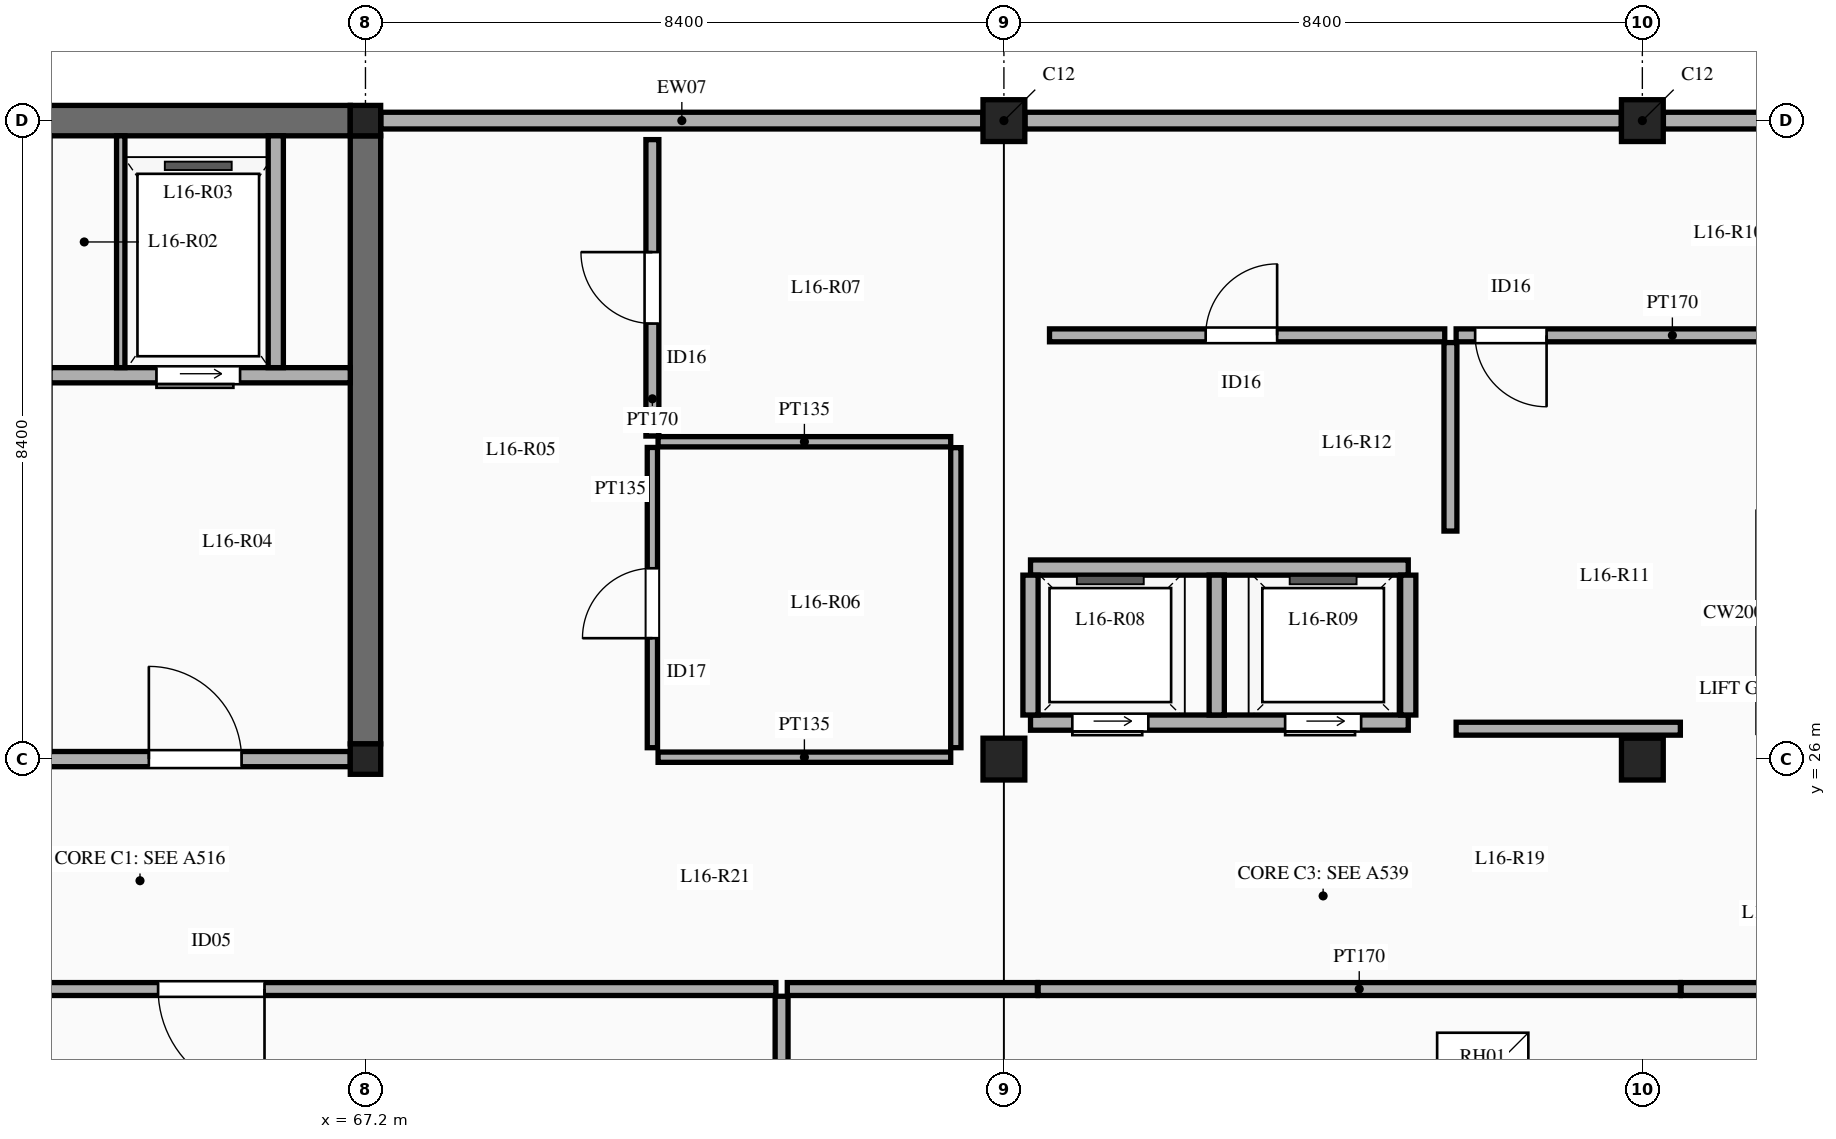
"""IFC4 building model, lengths in metres.
Left out: names, types, materials, properties, quantities, classifications, styles, units other than length and angle.
Written with IfcOpenShell. Run it as: python <this file> out.ifc"""

import sys

from ifc_helpers import new_model, si_unit, direction, frame, frame_2d, origin, origin_2d, place, context, subcontext, project, spatial, rectangle, extrude, element, fill, save


model = new_model("IFC4")
c1 = context("Model", 3, precision=1e-05, world=origin(), true_north=direction((0.0, 1.0)))
c2 = subcontext(c1, "Body", "Model", "MODEL_VIEW")
j1 = project(units=[si_unit("LENGTHUNIT", "METRE"), si_unit("PLANEANGLEUNIT", "RADIAN")], contexts=[c1])
p1 = place(None, origin())
s1 = spatial("IfcSite", under=j1, at=p1, CompositionType="ELEMENT")
p2 = place(p1, origin())
s2 = spatial("IfcBuilding", under=s1, at=p2, CompositionType="ELEMENT")
p3 = place(p2, frame((0.0, 0.0, 73.5)))
s3 = spatial("IfcBuildingStorey", under=s2, at=p3, CompositionType="ELEMENT", Elevation=73.5)
for number, where, z_axis, x_axis in (
    (1, (67.2, 26.0, 0.0), (0.0, 0.0, 1.0), (1.0, 0.0, 0.0)),
    (2, (67.2, 34.4, 0.0), (0.0, 0.0, 1.0), (1.0, 0.0, 0.0)),
):
    element("IfcColumn", number, at=place(p3, frame(where, z_axis=z_axis, x_axis=x_axis)), inside=s3, PredefinedType="COLUMN", context=c2, shape_type="SweptSolid", body=[
        extrude(rectangle(XDim=0.4, YDim=0.4, at=origin_2d()), origin(), (0.0, 0.0, 1.0), 4.5),
    ])
for number, where, z_axis, x_axis in (
    (3, (75.6, 26.0, 0.0), (0.0, 0.0, 1.0), (1.0, 0.0, 0.0)),
    (4, (75.6, 34.4, 0.0), (0.0, 0.0, 1.0), (1.0, 0.0, 0.0)),
    (5, (84.0, 26.0, 0.0), (0.0, 0.0, 1.0), (1.0, 0.0, 0.0)),
    (6, (84.0, 34.4, 0.0), (0.0, 0.0, 1.0), (1.0, 0.0, 0.0)),
):
    element("IfcColumn", number, at=place(p3, frame(where, z_axis=z_axis, x_axis=x_axis)), inside=s3, PredefinedType="COLUMN", context=c2, shape_type="SweptSolid", body=[
        extrude(rectangle(XDim=0.55, YDim=0.55, at=origin_2d()), origin(), (0.0, 0.0, 1.0), 4.5),
    ])
for number, where, z_axis, x_axis in (
    (7, (67.2, 26.2, 0.0), (0.0, 0.0, 1.0), (0.0, 1.0, 0.0)),
    (8, (59.0, 34.4, 0.0), (0.0, 0.0, 1.0), (1.0, 0.0, 0.0)),
):
    element("IfcWall", number, at=place(p3, frame(where, z_axis=z_axis, x_axis=x_axis)), inside=s3, PredefinedType="SHEAR", context=c2, shape_type="SweptSolid", body=[
        extrude(rectangle(XDim=8.0, YDim=0.4, at=frame_2d((4.0, 0.0))), origin(), (0.0, 0.0, 1.0), 4.5),
    ])
p4 = place(p3, frame((67.402, 34.4, 0.0), z_axis=(0.0, 0.0, 1.0), x_axis=(1.0, 0.0, 0.0)))
e9 = element("IfcWall", 9, at=p4, inside=s3, PredefinedType="USERDEFINED", context=c2, shape_type="SweptSolid", body=[
    extrude(rectangle(XDim=7.921, YDim=0.22, at=frame_2d((3.96, 0.0))), origin(), (0.0, 0.0, 1.0), 3.55),
])
p5 = place(p3, frame((75.877, 34.4, 0.0), z_axis=(0.0, 0.0, 1.0), x_axis=(1.0, 0.0, 0.0)))
e10 = element("IfcWall", 10, at=p5, inside=s3, PredefinedType="USERDEFINED", context=c2, shape_type="SweptSolid", body=[
    extrude(rectangle(XDim=7.846, YDim=0.22, at=frame_2d((3.923, 0.0))), origin(), (0.0, 0.0, 1.0), 3.55),
])
p6 = place(p3, frame((84.277, 34.4, 0.0), z_axis=(0.0, 0.0, 1.0), x_axis=(1.0, 0.0, 0.0)))
e11 = element("IfcWall", 11, at=p6, inside=s3, PredefinedType="USERDEFINED", context=c2, shape_type="SweptSolid", body=[
    extrude(rectangle(XDim=7.921, YDim=0.22, at=frame_2d((3.96, 0.0))), origin(), (0.0, 0.0, 1.0), 3.55),
])
p7 = place(p3, frame((59.0, 26.0, 0.0), z_axis=(0.0, 0.0, 1.0), x_axis=(1.0, 0.0, 0.0)))
e12 = element("IfcWall", 12, at=p7, inside=s3, PredefinedType="SOLIDWALL", context=c2, shape_type="SweptSolid", body=[
    extrude(rectangle(XDim=8.0, YDim=0.2, at=frame_2d((4.0, 0.0))), origin(), (0.0, 0.0, 1.0), 3.88),
])
p8 = place(p7, frame((1.55, 0.0, 0.0)))
e13 = element("IfcOpeningElement", 13, at=p8, cuts=e12, PredefinedType="OPENING", context=c2, shape_type="SweptSolid", body=[
    extrude(rectangle(XDim=1.15, YDim=2.15, at=frame_2d((0.575, 1.075))), frame((0.0, 0.11, 0.0), z_axis=(0.0, -1.0, 0.0), x_axis=(1.0, 0.0, 0.0)), (0.0, 0.0, 1.0), 0.22),
])
p9 = place(p7, frame((5.35, 0.0, 0.0)))
e14 = element("IfcOpeningElement", 14, at=p9, cuts=e12, PredefinedType="OPENING", context=c2, shape_type="SweptSolid", body=[
    extrude(rectangle(XDim=1.22, YDim=2.15, at=frame_2d((0.61, 1.075))), frame((0.0, 0.11, 0.0), z_axis=(0.0, -1.0, 0.0), x_axis=(1.0, 0.0, 0.0)), (0.0, 0.0, 1.0), 0.22),
])
p10 = place(p3, frame((63.05, 31.05, 0.0), z_axis=(0.0, 0.0, 1.0), x_axis=(1.0, 0.0, 0.0)))
e15 = element("IfcWall", 15, at=p10, inside=s3, PredefinedType="SOLIDWALL", context=c2, shape_type="SweptSolid", body=[
    extrude(rectangle(XDim=3.95, YDim=0.2, at=frame_2d((1.975, 0.0))), origin(), (0.0, 0.0, 1.0), 4.3),
])
p11 = place(p10, frame((1.4, 0.0, 0.0)))
e16 = element("IfcOpeningElement", 16, at=p11, cuts=e15, PredefinedType="OPENING", context=c2, shape_type="SweptSolid", body=[
    extrude(rectangle(XDim=1.1, YDim=2.15, at=frame_2d((0.55, 1.075))), frame((0.0, 0.11, 0.0), z_axis=(0.0, -1.0, 0.0), x_axis=(1.0, 0.0, 0.0)), (0.0, 0.0, 1.0), 0.22),
])
p12 = place(p3, frame((63.98, 31.15, 0.0), z_axis=(0.0, 0.0, 1.0), x_axis=(0.0, 1.0, 0.0)))
e17 = element("IfcWall", 17, at=p12, inside=s3, PredefinedType="PARTITIONING", context=c2, shape_type="SweptSolid", body=[
    extrude(rectangle(XDim=3.05, YDim=0.11, at=frame_2d((1.525, 0.0))), origin(), (0.0, 0.0, 1.0), 4.3),
])
p13 = place(p3, frame((66.02, 31.15, 0.0), z_axis=(0.0, 0.0, 1.0), x_axis=(0.0, 1.0, 0.0)))
e18 = element("IfcWall", 18, at=p13, inside=s3, PredefinedType="SOLIDWALL", context=c2, shape_type="SweptSolid", body=[
    extrude(rectangle(XDim=3.05, YDim=0.2, at=frame_2d((1.525, 0.0))), origin(), (0.0, 0.0, 1.0), 4.3),
])
p14 = place(p3, frame((75.95, 26.48, 0.0), z_axis=(0.0, 0.0, 1.0), x_axis=(1.0, 0.0, 0.0)))
e19 = element("IfcWall", 19, at=p14, inside=s3, PredefinedType="SOLIDWALL", context=c2, shape_type="SweptSolid", body=[
    extrude(rectangle(XDim=4.97, YDim=0.2, at=frame_2d((2.485, 0.0))), origin(), (0.0, 0.0, 1.0), 4.3),
])
p15 = place(p14, frame((0.55, 0.0, 0.0)))
e20 = element("IfcOpeningElement", 20, at=p15, cuts=e19, PredefinedType="OPENING", context=c2, shape_type="SweptSolid", body=[
    extrude(rectangle(XDim=1.0, YDim=2.15, at=frame_2d((0.5, 1.075))), frame((0.0, 0.11, 0.0), z_axis=(0.0, -1.0, 0.0), x_axis=(1.0, 0.0, 0.0)), (0.0, 0.0, 1.0), 0.22),
])
p16 = place(p14, frame((3.35, 0.0, 0.0)))
e21 = element("IfcOpeningElement", 21, at=p16, cuts=e19, PredefinedType="OPENING", context=c2, shape_type="SweptSolid", body=[
    extrude(rectangle(XDim=1.0, YDim=2.15, at=frame_2d((0.5, 1.075))), frame((0.0, 0.11, 0.0), z_axis=(0.0, -1.0, 0.0), x_axis=(1.0, 0.0, 0.0)), (0.0, 0.0, 1.0), 0.22),
])
p17 = place(p3, frame((75.95, 28.52, 0.0), z_axis=(0.0, 0.0, 1.0), x_axis=(1.0, 0.0, 0.0)))
e22 = element("IfcWall", 22, at=p17, inside=s3, PredefinedType="SOLIDWALL", context=c2, shape_type="SweptSolid", body=[
    extrude(rectangle(XDim=4.97, YDim=0.2, at=frame_2d((2.485, 0.0))), origin(), (0.0, 0.0, 1.0), 4.3),
])
for number, where, z_axis, x_axis in (
    (23, (75.95, 26.58, 0.0), (0.0, 0.0, 1.0), (0.0, 1.0, 0.0)),
    (24, (78.4, 26.58, 0.0), (0.0, 0.0, 1.0), (0.0, 1.0, 0.0)),
    (25, (80.92, 26.58, 0.0), (0.0, 0.0, 1.0), (0.0, 1.0, 0.0)),
):
    element("IfcWall", number, at=place(p3, frame(where, z_axis=z_axis, x_axis=x_axis)), inside=s3, PredefinedType="SOLIDWALL", context=c2, shape_type="SweptSolid", body=[
        extrude(rectangle(XDim=1.84, YDim=0.2, at=frame_2d((0.92, 0.0))), origin(), (0.0, 0.0, 1.0), 4.3),
    ])
p18 = place(p3, frame((70.975, 26.15, 0.0), z_axis=(0.0, 0.0, 1.0), x_axis=(0.0, 1.0, 0.0)))
e26 = element("IfcWall", 26, at=p18, inside=s3, PredefinedType="PARTITIONING", context=c2, shape_type="SweptSolid", body=[
    extrude(rectangle(XDim=3.95, YDim=0.135, at=frame_2d((1.975, 0.0))), origin(), (0.0, 0.0, 1.0), 3.45),
])
p19 = place(p18, frame((1.441, 0.0, 0.0)))
e27 = element("IfcOpeningElement", 27, at=p19, cuts=e26, PredefinedType="OPENING", context=c2, shape_type="SweptSolid", body=[
    extrude(rectangle(XDim=0.92, YDim=2.12, at=frame_2d((0.46, 1.06))), frame((0.0, 0.077, 0.0), z_axis=(0.0, -1.0, 0.0), x_axis=(1.0, 0.0, 0.0)), (0.0, 0.0, 1.0), 0.155),
])
p20 = place(p3, frame((70.975, 30.25, 0.0), z_axis=(0.0, 0.0, 1.0), x_axis=(0.0, 1.0, 0.0)))
e28 = element("IfcWall", 28, at=p20, inside=s3, PredefinedType="PARTITIONING", context=c2, shape_type="SweptSolid", body=[
    extrude(rectangle(XDim=3.9, YDim=0.17, at=frame_2d((1.95, 0.0))), origin(), (0.0, 0.0, 1.0), 3.45),
])
p21 = place(p20, frame((1.48, 0.0, 0.0)))
e29 = element("IfcOpeningElement", 29, at=p21, cuts=e28, PredefinedType="OPENING", context=c2, shape_type="SweptSolid", body=[
    extrude(rectangle(XDim=0.94, YDim=2.1, at=frame_2d((0.47, 1.05))), frame((0.0, 0.095, 0.0), z_axis=(0.0, -1.0, 0.0), x_axis=(1.0, 0.0, 0.0)), (0.0, 0.0, 1.0), 0.19),
])
for number, where, z_axis, x_axis in (
    (30, (71.05, 30.175, 0.0), (0.0, 0.0, 1.0), (1.0, 0.0, 0.0)),
    (31, (71.05, 26.025, 0.0), (0.0, 0.0, 1.0), (1.0, 0.0, 0.0)),
):
    element("IfcWall", number, at=place(p3, frame(where, z_axis=z_axis, x_axis=x_axis)), inside=s3, PredefinedType="PARTITIONING", context=c2, shape_type="SweptSolid", body=[
        extrude(rectangle(XDim=3.85, YDim=0.135, at=frame_2d((1.925, 0.0))), origin(), (0.0, 0.0, 1.0), 3.45),
    ])
p22 = place(p3, frame((81.55, 31.575, 0.0), z_axis=(0.0, 0.0, 1.0), x_axis=(1.0, 0.0, 0.0)))
e32 = element("IfcWall", 32, at=p22, inside=s3, PredefinedType="PARTITIONING", context=c2, shape_type="SweptSolid", body=[
    extrude(rectangle(XDim=4.0, YDim=0.17, at=frame_2d((2.0, 0.0))), origin(), (0.0, 0.0, 1.0), 3.45),
])
p23 = place(p22, frame((0.25, 0.0, 0.0)))
e33 = element("IfcOpeningElement", 33, at=p23, cuts=e32, PredefinedType="OPENING", context=c2, shape_type="SweptSolid", body=[
    extrude(rectangle(XDim=0.94, YDim=2.1, at=frame_2d((0.47, 1.05))), frame((0.0, 0.095, 0.0), z_axis=(0.0, -1.0, 0.0), x_axis=(1.0, 0.0, 0.0)), (0.0, 0.0, 1.0), 0.19),
])
p24 = place(p3, frame((76.2, 31.575, 0.0), z_axis=(0.0, 0.0, 1.0), x_axis=(1.0, 0.0, 0.0)))
e34 = element("IfcWall", 34, at=p24, inside=s3, PredefinedType="PARTITIONING", context=c2, shape_type="SweptSolid", body=[
    extrude(rectangle(XDim=5.2, YDim=0.17, at=frame_2d((2.6, 0.0))), origin(), (0.0, 0.0, 1.0), 3.45),
])
p25 = place(p24, frame((2.055, 0.0, 0.0)))
e35 = element("IfcOpeningElement", 35, at=p25, cuts=e34, PredefinedType="OPENING", context=c2, shape_type="SweptSolid", body=[
    extrude(rectangle(XDim=0.94, YDim=2.1, at=frame_2d((0.47, 1.05))), frame((0.0, 0.095, 0.0), z_axis=(0.0, -1.0, 0.0), x_axis=(1.0, 0.0, 0.0)), (0.0, 0.0, 1.0), 0.19),
])
p26 = place(p3, frame((81.475, 29.0, 0.0), z_axis=(0.0, 0.0, 1.0), x_axis=(0.0, 1.0, 0.0)))
e36 = element("IfcWall", 36, at=p26, inside=s3, PredefinedType="PARTITIONING", context=c2, shape_type="SweptSolid", body=[
    extrude(rectangle(XDim=2.48, YDim=0.17, at=frame_2d((1.24, 0.0))), origin(), (0.0, 0.0, 1.0), 3.45),
])
p27 = place(p3, frame((81.55, 26.4, 0.0), z_axis=(0.0, 0.0, 1.0), x_axis=(1.0, 0.0, 0.0)))
e37 = element("IfcWall", 37, at=p27, inside=s3, PredefinedType="PARTITIONING", context=c2, shape_type="SweptSolid", body=[
    extrude(rectangle(XDim=2.95, YDim=0.17, at=frame_2d((1.475, 0.0))), origin(), (0.0, 0.0, 1.0), 3.45),
])
p28 = place(p3, frame((76.05, 22.975, 0.0), z_axis=(0.0, 0.0, 1.0), x_axis=(1.0, 0.0, 0.0)))
e38 = element("IfcWall", 38, at=p28, inside=s3, PredefinedType="PARTITIONING", context=c2, shape_type="SweptSolid", body=[
    extrude(rectangle(XDim=8.45, YDim=0.17, at=frame_2d((4.225, 0.0))), origin(), (0.0, 0.0, 1.0), 3.45),
])
p29 = place(p3, frame((84.51, 22.975, 0.0), z_axis=(0.0, 0.0, 1.0), x_axis=(1.0, 0.0, 0.0)))
e39 = element("IfcWall", 39, at=p29, inside=s3, PredefinedType="PARTITIONING", context=c2, shape_type="SweptSolid", body=[
    extrude(rectangle(XDim=3.74, YDim=0.17, at=frame_2d((1.87, 0.0))), origin(), (0.0, 0.0, 1.0), 3.45),
])
p30 = place(p3, frame((59.25, 22.975, 0.0), z_axis=(0.0, 0.0, 1.0), x_axis=(1.0, 0.0, 0.0)))
e40 = element("IfcWall", 40, at=p30, inside=s3, PredefinedType="PARTITIONING", context=c2, shape_type="SweptSolid", body=[
    extrude(rectangle(XDim=13.35, YDim=0.17, at=frame_2d((6.675, 0.0))), origin(), (0.0, 0.0, 1.0), 3.45),
])
p31 = place(p30, frame((5.222, 0.0, 0.0)))
e41 = element("IfcOpeningElement", 41, at=p31, cuts=e40, PredefinedType="OPENING", context=c2, shape_type="SweptSolid", body=[
    extrude(rectangle(XDim=1.4, YDim=2.25, at=frame_2d((0.7, 1.125))), frame((0.0, 0.095, 0.0), z_axis=(0.0, -1.0, 0.0), x_axis=(1.0, 0.0, 0.0)), (0.0, 0.0, 1.0), 0.19),
])
p32 = place(p3, frame((72.75, 22.975, 0.0), z_axis=(0.0, 0.0, 1.0), x_axis=(1.0, 0.0, 0.0)))
e42 = element("IfcWall", 42, at=p32, inside=s3, PredefinedType="PARTITIONING", context=c2, shape_type="SweptSolid", body=[
    extrude(rectangle(XDim=3.29, YDim=0.17, at=frame_2d((1.645, 0.0))), origin(), (0.0, 0.0, 1.0), 3.45),
])
p33 = place(p3, frame((72.675, 9.65, 0.0), z_axis=(0.0, 0.0, 1.0), x_axis=(0.0, 1.0, 0.0)))
e43 = element("IfcWall", 43, at=p33, inside=s3, PredefinedType="PARTITIONING", context=c2, shape_type="SweptSolid", body=[
    extrude(rectangle(XDim=13.23, YDim=0.17, at=frame_2d((6.615, 0.0))), origin(), (0.0, 0.0, 1.0), 3.45),
])
p34 = place(p3, frame((74.968, 26.15, 0.0), z_axis=(0.0, 0.0, 1.0), x_axis=(0.0, 1.0, 0.0)))
e44 = element("IfcWall", 44, at=p34, inside=s3, PredefinedType="PARTITIONING", context=c2, shape_type="SweptSolid", body=[
    extrude(rectangle(XDim=3.948, YDim=0.135, at=frame_2d((1.974, 0.0))), origin(), (0.0, 0.0, 1.0), 3.45),
])
p35 = place(p2, frame((0.0, 0.0, 78.0)))
p36 = place(p35, frame((0.0, 0.0, -0.23)))
p37 = place(p36, frame((81.9, 21.8, 0.0)))
p38 = place(p37, frame((0.0, 0.0, 0.18)))
e45 = element("IfcWindow", 45, at=p38, inside=s3, PartitioningType="SINGLE_PANEL", PredefinedType="SKYLIGHT", context=c2, shape_type="SweptSolid", body=[
    extrude(rectangle(XDim=1.2, YDim=1.2, at=origin_2d()), origin(), (0.0, 0.0, 1.0), 0.05),
])
p39 = place(p9, origin())
e46 = element("IfcDoor", 46, at=p39, inside=s3, OperationType="SINGLE_SWING_LEFT", PredefinedType="DOOR", context=c2, shape_type="SweptSolid", body=[
    extrude(rectangle(XDim=1.22, YDim=2.15, at=frame_2d((0.61, 1.075))), frame((0.0, 0.025, 0.0), z_axis=(0.0, -1.0, 0.0), x_axis=(1.0, 0.0, 0.0)), (0.0, 0.0, 1.0), 0.05),
])
fill(e14, e46)
p40 = place(p11, frame((1.1, 0.0, 0.0), z_axis=(0.0, 0.0, 1.0), x_axis=(-1.0, 0.0, 0.0)))
e47 = element("IfcDoor", 47, at=p40, inside=s3, OperationType="SLIDING_TO_LEFT", PredefinedType="DOOR", context=c2, shape_type="SweptSolid", body=[
    extrude(rectangle(XDim=1.1, YDim=2.15, at=frame_2d((0.55, 1.075))), frame((0.0, 0.025, 0.0), z_axis=(0.0, -1.0, 0.0), x_axis=(1.0, 0.0, 0.0)), (0.0, 0.0, 1.0), 0.05),
])
fill(e16, e47)
p41 = place(p15, frame((1.0, 0.0, 0.0), z_axis=(0.0, 0.0, 1.0), x_axis=(-1.0, 0.0, 0.0)))
e48 = element("IfcDoor", 48, at=p41, inside=s3, OperationType="SLIDING_TO_LEFT", PredefinedType="DOOR", context=c2, shape_type="SweptSolid", body=[
    extrude(rectangle(XDim=1.0, YDim=2.15, at=frame_2d((0.5, 1.075))), frame((0.0, 0.025, 0.0), z_axis=(0.0, -1.0, 0.0), x_axis=(1.0, 0.0, 0.0)), (0.0, 0.0, 1.0), 0.05),
])
fill(e20, e48)
p42 = place(p16, frame((1.0, 0.0, 0.0), z_axis=(0.0, 0.0, 1.0), x_axis=(-1.0, 0.0, 0.0)))
e49 = element("IfcDoor", 49, at=p42, inside=s3, OperationType="SLIDING_TO_LEFT", PredefinedType="DOOR", context=c2, shape_type="SweptSolid", body=[
    extrude(rectangle(XDim=1.0, YDim=2.15, at=frame_2d((0.5, 1.075))), frame((0.0, 0.025, 0.0), z_axis=(0.0, -1.0, 0.0), x_axis=(1.0, 0.0, 0.0)), (0.0, 0.0, 1.0), 0.05),
])
fill(e21, e49)
p43 = place(p19, origin())
e50 = element("IfcDoor", 50, at=p43, inside=s3, OperationType="SINGLE_SWING_LEFT", PredefinedType="DOOR", context=c2, shape_type="SweptSolid", body=[
    extrude(rectangle(XDim=0.92, YDim=2.12, at=frame_2d((0.46, 1.06))), frame((0.0, 0.025, 0.0), z_axis=(0.0, -1.0, 0.0), x_axis=(1.0, 0.0, 0.0)), (0.0, 0.0, 1.0), 0.05),
])
fill(e27, e50)
p44 = place(p21, origin())
e51 = element("IfcDoor", 51, at=p44, inside=s3, OperationType="SINGLE_SWING_RIGHT", PredefinedType="DOOR", context=c2, shape_type="SweptSolid", body=[
    extrude(rectangle(XDim=0.94, YDim=2.1, at=frame_2d((0.47, 1.05))), frame((0.0, 0.025, 0.0), z_axis=(0.0, -1.0, 0.0), x_axis=(1.0, 0.0, 0.0)), (0.0, 0.0, 1.0), 0.05),
])
fill(e29, e51)
p45 = place(p23, frame((0.94, 0.0, 0.0), z_axis=(0.0, 0.0, 1.0), x_axis=(-1.0, 0.0, 0.0)))
e52 = element("IfcDoor", 52, at=p45, inside=s3, OperationType="SINGLE_SWING_LEFT", PredefinedType="DOOR", context=c2, shape_type="SweptSolid", body=[
    extrude(rectangle(XDim=0.94, YDim=2.1, at=frame_2d((0.47, 1.05))), frame((0.0, 0.025, 0.0), z_axis=(0.0, -1.0, 0.0), x_axis=(1.0, 0.0, 0.0)), (0.0, 0.0, 1.0), 0.05),
])
fill(e33, e52)
p46 = place(p25, origin())
e53 = element("IfcDoor", 53, at=p46, inside=s3, OperationType="SINGLE_SWING_RIGHT", PredefinedType="DOOR", context=c2, shape_type="SweptSolid", body=[
    extrude(rectangle(XDim=0.94, YDim=2.1, at=frame_2d((0.47, 1.05))), frame((0.0, 0.025, 0.0), z_axis=(0.0, -1.0, 0.0), x_axis=(1.0, 0.0, 0.0)), (0.0, 0.0, 1.0), 0.05),
])
fill(e35, e53)
p47 = place(p31, frame((1.4, 0.0, 0.0), z_axis=(0.0, 0.0, 1.0), x_axis=(-1.0, 0.0, 0.0)))
e54 = element("IfcDoor", 54, at=p47, inside=s3, OperationType="SINGLE_SWING_LEFT", PredefinedType="DOOR", context=c2, shape_type="SweptSolid", body=[
    extrude(rectangle(XDim=1.4, YDim=2.25, at=frame_2d((0.7, 1.125))), frame((0.0, 0.025, 0.0), z_axis=(0.0, -1.0, 0.0), x_axis=(1.0, 0.0, 0.0)), (0.0, 0.0, 1.0), 0.05),
])
fill(e41, e54)
save(model, sys.argv[1])
